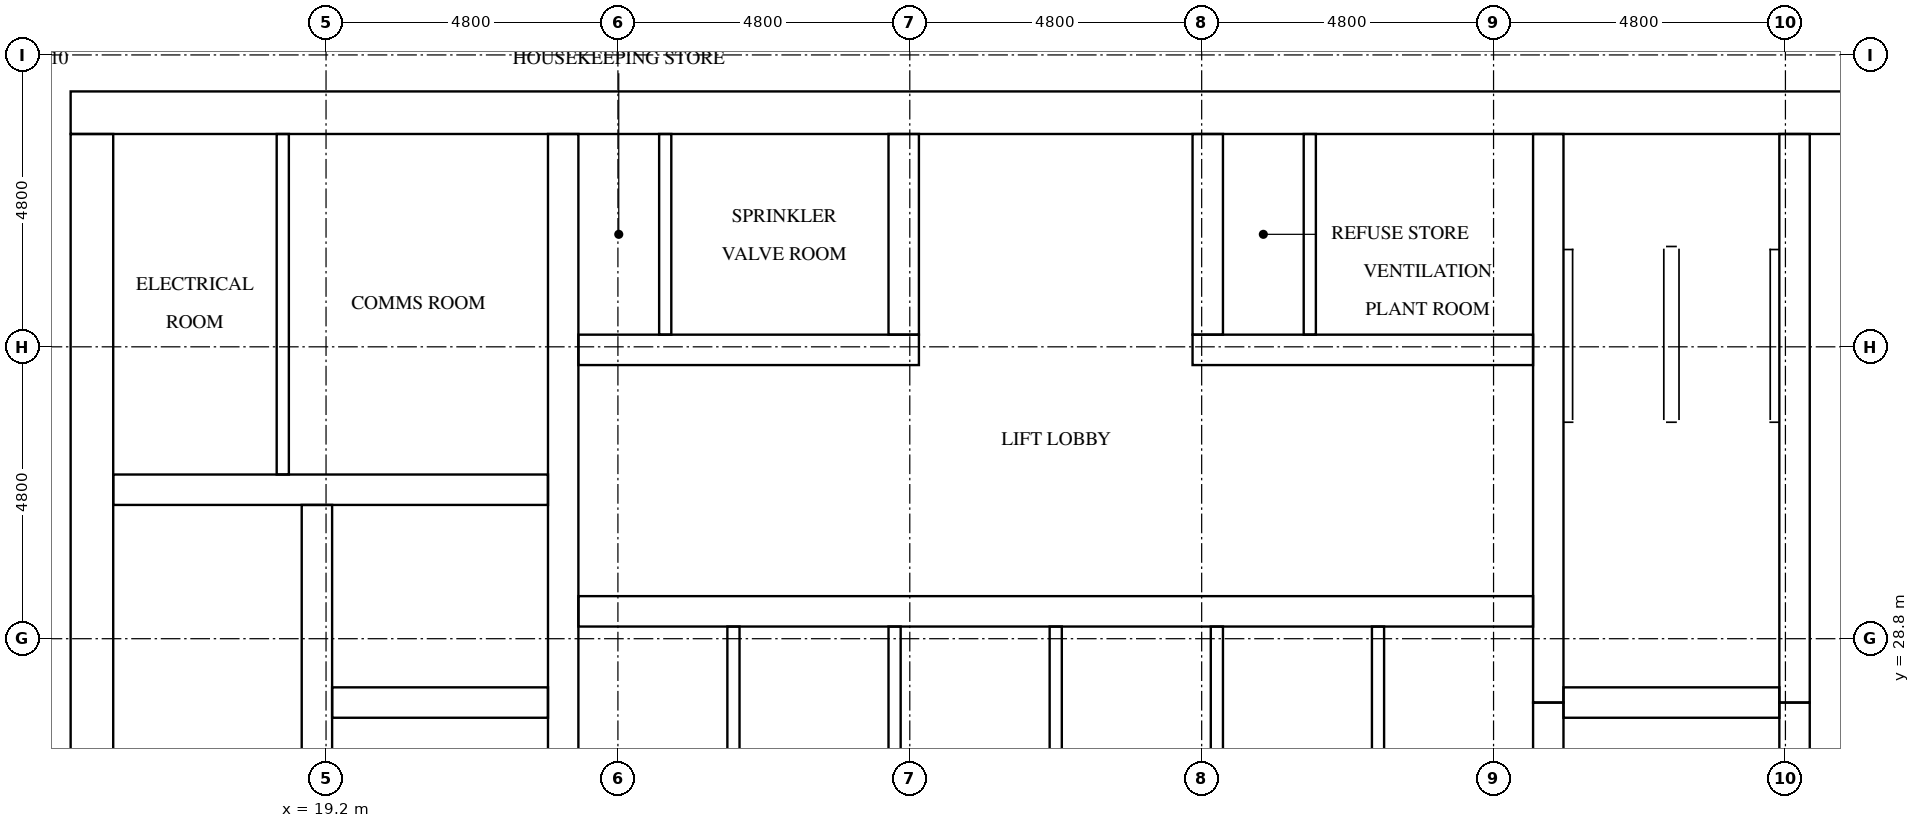
"""IFC4 building model, lengths in metres.
Left out: names, types, materials, properties, quantities, classifications, styles, units other than length and angle.
Written with IfcOpenShell. Run it as: python <this file> out.ifc"""

import sys

from ifc_helpers import new_model, si_unit, direction, frame, frame_2d, origin, place, context, subcontext, project, spatial, rectangle, extrude, element, fill, save


model = new_model("IFC4")
c1 = context("Model", 3, precision=1e-05, world=origin(), true_north=direction((0.0, 1.0)))
c2 = subcontext(c1, "Body", "Model", "MODEL_VIEW")
j1 = project(units=[si_unit("LENGTHUNIT", "METRE"), si_unit("PLANEANGLEUNIT", "RADIAN")], contexts=[c1])
p1 = place(None, origin())
s1 = spatial("IfcSite", under=j1, at=p1, CompositionType="ELEMENT")
p2 = place(p1, origin())
s2 = spatial("IfcBuilding", under=s1, at=p2, CompositionType="ELEMENT")
p3 = place(p2, frame((0.0, 0.0, 199.9)))
s3 = spatial("IfcBuildingStorey", under=s2, at=p3, CompositionType="ELEMENT", Elevation=199.9)
p4 = place(p3, frame((15.0, 37.45, 0.0), z_axis=(0.0, 0.0, 1.0), x_axis=(1.0, 0.0, 0.0)))
e1 = element("IfcWall", 1, at=p4, inside=s3, PredefinedType="SHEAR", context=c2, shape_type="SweptSolid", body=[
    extrude(rectangle(XDim=32.4, YDim=0.7, at=frame_2d((16.2, 0.0))), origin(), (0.0, 0.0, 1.0), 3.1),
])
p5 = place(p4, frame((15.3, 0.0, 0.0)))
e2 = element("IfcOpeningElement", 2, at=p5, cuts=e1, PredefinedType="OPENING", context=c2, shape_type="SweptSolid", body=[
    extrude(rectangle(XDim=1.8, YDim=2.1, at=frame_2d((0.9, 1.05))), frame((0.0, 0.36, 0.0), z_axis=(0.0, -1.0, 0.0), x_axis=(1.0, 0.0, 0.0)), (0.0, 0.0, 1.0), 0.72),
])
p6 = place(p4, frame((1.544, 0.0, 0.0)))
e3 = element("IfcOpeningElement", 3, at=p6, cuts=e1, PredefinedType="OPENING", context=c2, shape_type="SweptSolid", body=[
    extrude(rectangle(XDim=1.0, YDim=2.1, at=frame_2d((0.5, 1.05))), frame((0.0, 0.36, 0.0), z_axis=(0.0, -1.0, 0.0), x_axis=(1.0, 0.0, 0.0)), (0.0, 0.0, 1.0), 0.72),
])
p7 = place(p4, frame((5.219, 0.0, 0.0)))
e4 = element("IfcOpeningElement", 4, at=p7, cuts=e1, PredefinedType="OPENING", context=c2, shape_type="SweptSolid", body=[
    extrude(rectangle(XDim=1.0, YDim=2.1, at=frame_2d((0.5, 1.05))), frame((0.0, 0.36, 0.0), z_axis=(0.0, -1.0, 0.0), x_axis=(1.0, 0.0, 0.0)), (0.0, 0.0, 1.0), 0.72),
])
p8 = place(p3, frame((15.35, 15.7, 0.0), z_axis=(0.0, 0.0, 1.0), x_axis=(0.0, 1.0, 0.0)))
e5 = element("IfcWall", 5, at=p8, inside=s3, PredefinedType="SHEAR", context=c2, shape_type="SweptSolid", body=[
    extrude(rectangle(XDim=21.4, YDim=0.7, at=frame_2d((10.7, 0.0))), origin(), (0.0, 0.0, 1.0), 3.1),
])
p9 = place(p8, frame((5.06, 0.0, 0.0)))
e6 = element("IfcOpeningElement", 6, at=p9, cuts=e5, PredefinedType="OPENING", context=c2, shape_type="SweptSolid", body=[
    extrude(rectangle(XDim=1.2, YDim=2.1, at=frame_2d((0.6, 1.05))), frame((0.0, 0.36, 0.0), z_axis=(0.0, -1.0, 0.0), x_axis=(1.0, 0.0, 0.0)), (0.0, 0.0, 1.0), 0.72),
])
p10 = place(p3, frame((19.05, 15.7, 0.0), z_axis=(0.0, 0.0, 1.0), x_axis=(0.0, 1.0, 0.0)))
e7 = element("IfcWall", 7, at=p10, inside=s3, PredefinedType="SHEAR", context=c2, shape_type="SweptSolid", body=[
    extrude(rectangle(XDim=15.3, YDim=0.5, at=frame_2d((7.65, 0.0))), origin(), (0.0, 0.0, 1.0), 3.1),
])
p11 = place(p10, frame((9.75, 0.0, 0.0)))
e8 = element("IfcOpeningElement", 8, at=p11, cuts=e7, PredefinedType="OPENING", context=c2, shape_type="SweptSolid", body=[
    extrude(rectangle(XDim=1.1, YDim=2.1, at=frame_2d((0.55, 1.05))), frame((0.0, 0.26, 0.0), z_axis=(0.0, -1.0, 0.0), x_axis=(1.0, 0.0, 0.0)), (0.0, 0.0, 1.0), 0.52),
])
p12 = place(p10, frame((13.25, 0.0, 0.0)))
e9 = element("IfcOpeningElement", 9, at=p12, cuts=e7, PredefinedType="OPENING", context=c2, shape_type="SweptSolid", body=[
    extrude(rectangle(XDim=1.1, YDim=2.1, at=frame_2d((0.55, 1.05))), frame((0.0, 0.26, 0.0), z_axis=(0.0, -1.0, 0.0), x_axis=(1.0, 0.0, 0.0)), (0.0, 0.0, 1.0), 0.52),
])
p13 = place(p10, frame((0.5, 0.0, 0.0)))
e10 = element("IfcOpeningElement", 10, at=p13, cuts=e7, PredefinedType="OPENING", context=c2, shape_type="SweptSolid", body=[
    extrude(rectangle(XDim=1.2, YDim=2.1, at=frame_2d((0.6, 1.05))), frame((0.0, 0.26, 0.0), z_axis=(0.0, -1.0, 0.0), x_axis=(1.0, 0.0, 0.0)), (0.0, 0.0, 1.0), 0.52),
])
p14 = place(p3, frame((23.1, 15.7, 0.0), z_axis=(0.0, 0.0, 1.0), x_axis=(0.0, 1.0, 0.0)))
e11 = element("IfcWall", 11, at=p14, inside=s3, PredefinedType="SHEAR", context=c2, shape_type="SweptSolid", body=[
    extrude(rectangle(XDim=21.4, YDim=0.5, at=frame_2d((10.7, 0.0))), origin(), (0.0, 0.0, 1.0), 3.1),
])
p15 = place(p3, frame((39.3, 24.25, 0.0), z_axis=(0.0, 0.0, 1.0), x_axis=(0.0, 1.0, 0.0)))
e12 = element("IfcWall", 12, at=p15, inside=s3, PredefinedType="SHEAR", context=c2, shape_type="SweptSolid", body=[
    extrude(rectangle(XDim=3.5, YDim=0.5, at=frame_2d((1.75, 0.0))), origin(), (0.0, 0.0, 1.0), 3.1),
])
p16 = place(p3, frame((39.3, 27.75, 0.0), z_axis=(0.0, 0.0, 1.0), x_axis=(0.0, 1.0, 0.0)))
e13 = element("IfcWall", 13, at=p16, inside=s3, PredefinedType="SHEAR", context=c2, shape_type="SweptSolid", body=[
    extrude(rectangle(XDim=9.35, YDim=0.5, at=frame_2d((4.675, 0.0))), origin(), (0.0, 0.0, 1.0), 3.1),
])
p17 = place(p3, frame((43.35, 24.25, 0.0), z_axis=(0.0, 0.0, 1.0), x_axis=(0.0, 1.0, 0.0)))
e14 = element("IfcWall", 14, at=p17, inside=s3, PredefinedType="SHEAR", context=c2, shape_type="SweptSolid", body=[
    extrude(rectangle(XDim=3.5, YDim=0.5, at=frame_2d((1.75, 0.0))), origin(), (0.0, 0.0, 1.0), 3.1),
])
p18 = place(p17, frame((1.2, 0.0, 0.0)))
e15 = element("IfcOpeningElement", 15, at=p18, cuts=e14, PredefinedType="OPENING", context=c2, shape_type="SweptSolid", body=[
    extrude(rectangle(XDim=1.1, YDim=2.1, at=frame_2d((0.55, 1.05))), frame((0.0, 0.26, 0.0), z_axis=(0.0, -1.0, 0.0), x_axis=(1.0, 0.0, 0.0)), (0.0, 0.0, 1.0), 0.52),
])
p19 = place(p3, frame((43.35, 27.75, 0.0), z_axis=(0.0, 0.0, 1.0), x_axis=(0.0, 1.0, 0.0)))
e16 = element("IfcWall", 16, at=p19, inside=s3, PredefinedType="SHEAR", context=c2, shape_type="SweptSolid", body=[
    extrude(rectangle(XDim=9.35, YDim=0.5, at=frame_2d((4.675, 0.0))), origin(), (0.0, 0.0, 1.0), 3.1),
])
p20 = place(p19, frame((7.65, 0.0, 0.0)))
e17 = element("IfcOpeningElement", 17, at=p20, cuts=e16, PredefinedType="OPENING", context=c2, shape_type="SweptSolid", body=[
    extrude(rectangle(XDim=1.2, YDim=2.1, at=frame_2d((0.6, 1.05))), frame((0.0, 0.26, 0.0), z_axis=(0.0, -1.0, 0.0), x_axis=(1.0, 0.0, 0.0)), (0.0, 0.0, 1.0), 0.52),
])
p21 = place(p3, frame((19.3, 27.75, 0.0), z_axis=(0.0, 0.0, 1.0), x_axis=(1.0, 0.0, 0.0)))
e18 = element("IfcWall", 18, at=p21, inside=s3, PredefinedType="SHEAR", context=c2, shape_type="SweptSolid", body=[
    extrude(rectangle(XDim=3.55, YDim=0.5, at=frame_2d((1.775, 0.0))), origin(), (0.0, 0.0, 1.0), 3.1),
])
p22 = place(p3, frame((15.7, 31.25, 0.0), z_axis=(0.0, 0.0, 1.0), x_axis=(1.0, 0.0, 0.0)))
e19 = element("IfcWall", 19, at=p22, inside=s3, PredefinedType="SHEAR", context=c2, shape_type="SweptSolid", body=[
    extrude(rectangle(XDim=7.15, YDim=0.5, at=frame_2d((3.575, 0.0))), origin(), (0.0, 0.0, 1.0), 3.1),
])
p23 = place(p3, frame((39.55, 27.75, 0.0), z_axis=(0.0, 0.0, 1.0), x_axis=(1.0, 0.0, 0.0)))
e20 = element("IfcWall", 20, at=p23, inside=s3, PredefinedType="SHEAR", context=c2, shape_type="SweptSolid", body=[
    extrude(rectangle(XDim=3.55, YDim=0.5, at=frame_2d((1.775, 0.0))), origin(), (0.0, 0.0, 1.0), 3.1),
])
p24 = place(p3, frame((23.35, 29.25, 0.0), z_axis=(0.0, 0.0, 1.0), x_axis=(1.0, 0.0, 0.0)))
e21 = element("IfcWall", 21, at=p24, inside=s3, PredefinedType="SHEAR", context=c2, shape_type="SweptSolid", body=[
    extrude(rectangle(XDim=15.7, YDim=0.5, at=frame_2d((7.85, 0.0))), origin(), (0.0, 0.0, 1.0), 3.1),
])
p25 = place(p24, frame((0.675, 0.0, 0.0)))
e22 = element("IfcOpeningElement", 22, at=p25, cuts=e21, PredefinedType="OPENING", context=c2, shape_type="SweptSolid", body=[
    extrude(rectangle(XDim=1.1, YDim=2.1, at=frame_2d((0.55, 1.05))), frame((0.0, 0.26, 0.0), z_axis=(0.0, -1.0, 0.0), x_axis=(1.0, 0.0, 0.0)), (0.0, 0.0, 1.0), 0.52),
])
p26 = place(p24, frame((3.325, 0.0, 0.0)))
e23 = element("IfcOpeningElement", 23, at=p26, cuts=e21, PredefinedType="OPENING", context=c2, shape_type="SweptSolid", body=[
    extrude(rectangle(XDim=1.1, YDim=2.1, at=frame_2d((0.55, 1.05))), frame((0.0, 0.26, 0.0), z_axis=(0.0, -1.0, 0.0), x_axis=(1.0, 0.0, 0.0)), (0.0, 0.0, 1.0), 0.52),
])
p27 = place(p24, frame((5.975, 0.0, 0.0)))
e24 = element("IfcOpeningElement", 24, at=p27, cuts=e21, PredefinedType="OPENING", context=c2, shape_type="SweptSolid", body=[
    extrude(rectangle(XDim=1.1, YDim=2.1, at=frame_2d((0.55, 1.05))), frame((0.0, 0.26, 0.0), z_axis=(0.0, -1.0, 0.0), x_axis=(1.0, 0.0, 0.0)), (0.0, 0.0, 1.0), 0.52),
])
p28 = place(p24, frame((8.625, 0.0, 0.0)))
e25 = element("IfcOpeningElement", 25, at=p28, cuts=e21, PredefinedType="OPENING", context=c2, shape_type="SweptSolid", body=[
    extrude(rectangle(XDim=1.1, YDim=2.1, at=frame_2d((0.55, 1.05))), frame((0.0, 0.26, 0.0), z_axis=(0.0, -1.0, 0.0), x_axis=(1.0, 0.0, 0.0)), (0.0, 0.0, 1.0), 0.52),
])
p29 = place(p24, frame((11.275, 0.0, 0.0)))
e26 = element("IfcOpeningElement", 26, at=p29, cuts=e21, PredefinedType="OPENING", context=c2, shape_type="SweptSolid", body=[
    extrude(rectangle(XDim=1.1, YDim=2.1, at=frame_2d((0.55, 1.05))), frame((0.0, 0.26, 0.0), z_axis=(0.0, -1.0, 0.0), x_axis=(1.0, 0.0, 0.0)), (0.0, 0.0, 1.0), 0.52),
])
p30 = place(p24, frame((13.925, 0.0, 0.0)))
e27 = element("IfcOpeningElement", 27, at=p30, cuts=e21, PredefinedType="OPENING", context=c2, shape_type="SweptSolid", body=[
    extrude(rectangle(XDim=1.1, YDim=2.1, at=frame_2d((0.55, 1.05))), frame((0.0, 0.26, 0.0), z_axis=(0.0, -1.0, 0.0), x_axis=(1.0, 0.0, 0.0)), (0.0, 0.0, 1.0), 0.52),
])
p31 = place(p3, frame((23.35, 33.55, 0.0), z_axis=(0.0, 0.0, 1.0), x_axis=(1.0, 0.0, 0.0)))
e28 = element("IfcWall", 28, at=p31, inside=s3, PredefinedType="SHEAR", context=c2, shape_type="SweptSolid", body=[
    extrude(rectangle(XDim=5.6, YDim=0.5, at=frame_2d((2.8, 0.0))), origin(), (0.0, 0.0, 1.0), 3.1),
])
p32 = place(p31, frame((0.164, 0.0, 0.0)))
e29 = element("IfcOpeningElement", 29, at=p32, cuts=e28, PredefinedType="OPENING", context=c2, shape_type="SweptSolid", body=[
    extrude(rectangle(XDim=1.0, YDim=2.1, at=frame_2d((0.5, 1.05))), frame((0.0, 0.26, 0.0), z_axis=(0.0, -1.0, 0.0), x_axis=(1.0, 0.0, 0.0)), (0.0, 0.0, 1.0), 0.52),
])
p33 = place(p31, frame((2.814, 0.0, 0.0)))
e30 = element("IfcOpeningElement", 30, at=p33, cuts=e28, PredefinedType="OPENING", context=c2, shape_type="SweptSolid", body=[
    extrude(rectangle(XDim=1.0, YDim=2.1, at=frame_2d((0.5, 1.05))), frame((0.0, 0.26, 0.0), z_axis=(0.0, -1.0, 0.0), x_axis=(1.0, 0.0, 0.0)), (0.0, 0.0, 1.0), 0.52),
])
p34 = place(p3, frame((33.45, 33.55, 0.0), z_axis=(0.0, 0.0, 1.0), x_axis=(1.0, 0.0, 0.0)))
e31 = element("IfcWall", 31, at=p34, inside=s3, PredefinedType="SHEAR", context=c2, shape_type="SweptSolid", body=[
    extrude(rectangle(XDim=5.6, YDim=0.5, at=frame_2d((2.8, 0.0))), origin(), (0.0, 0.0, 1.0), 3.1),
])
p35 = place(p34, frame((0.664, 0.0, 0.0)))
e32 = element("IfcOpeningElement", 32, at=p35, cuts=e31, PredefinedType="OPENING", context=c2, shape_type="SweptSolid", body=[
    extrude(rectangle(XDim=1.0, YDim=2.1, at=frame_2d((0.5, 1.05))), frame((0.0, 0.26, 0.0), z_axis=(0.0, -1.0, 0.0), x_axis=(1.0, 0.0, 0.0)), (0.0, 0.0, 1.0), 0.52),
])
p36 = place(p34, frame((3.314, 0.0, 0.0)))
e33 = element("IfcOpeningElement", 33, at=p36, cuts=e31, PredefinedType="OPENING", context=c2, shape_type="SweptSolid", body=[
    extrude(rectangle(XDim=1.0, YDim=2.1, at=frame_2d((0.5, 1.05))), frame((0.0, 0.26, 0.0), z_axis=(0.0, -1.0, 0.0), x_axis=(1.0, 0.0, 0.0)), (0.0, 0.0, 1.0), 0.52),
])
for number, where, z_axis, x_axis in (
    (34, (28.7, 33.8, 0.0), (0.0, 0.0, 1.0), (0.0, 1.0, 0.0)),
    (35, (33.7, 33.8, 0.0), (0.0, 0.0, 1.0), (0.0, 1.0, 0.0)),
):
    element("IfcWall", number, at=place(p3, frame(where, z_axis=z_axis, x_axis=x_axis)), inside=s3, PredefinedType="SHEAR", context=c2, shape_type="SweptSolid", body=[
        extrude(rectangle(XDim=3.3, YDim=0.5, at=frame_2d((1.65, 0.0))), origin(), (0.0, 0.0, 1.0), 3.1),
    ])
for number, where, z_axis, x_axis in (
    (36, (25.9, 26.4, 0.0), (0.0, 0.0, 1.0), (0.0, 1.0, 0.0)),
    (37, (28.55, 26.4, 0.0), (0.0, 0.0, 1.0), (0.0, 1.0, 0.0)),
    (38, (31.2, 26.4, 0.0), (0.0, 0.0, 1.0), (0.0, 1.0, 0.0)),
    (39, (33.85, 26.4, 0.0), (0.0, 0.0, 1.0), (0.0, 1.0, 0.0)),
    (40, (36.5, 26.4, 0.0), (0.0, 0.0, 1.0), (0.0, 1.0, 0.0)),
):
    element("IfcWall", number, at=place(p3, frame(where, z_axis=z_axis, x_axis=x_axis)), inside=s3, PredefinedType="SOLIDWALL", context=c2, shape_type="SweptSolid", body=[
        extrude(rectangle(XDim=2.6, YDim=0.2, at=frame_2d((1.3, 0.0))), origin(), (0.0, 0.0, 1.0), 3.1),
    ])
p37 = place(p3, frame((18.489, 31.5, 0.0), z_axis=(0.0, 0.0, 1.0), x_axis=(0.0, 1.0, 0.0)))
e41 = element("IfcWall", 41, at=p37, inside=s3, PredefinedType="PARTITIONING", context=c2, shape_type="SweptSolid", body=[
    extrude(rectangle(XDim=5.6, YDim=0.2, at=frame_2d((2.8, 0.0))), origin(), (0.0, 0.0, 1.0), 3.1),
])
for number, where, z_axis, x_axis in (
    (42, (24.778, 33.8, 0.0), (0.0, 0.0, 1.0), (0.0, 1.0, 0.0)),
    (43, (35.378, 33.8, 0.0), (0.0, 0.0, 1.0), (0.0, 1.0, 0.0)),
):
    element("IfcWall", number, at=place(p3, frame(where, z_axis=z_axis, x_axis=x_axis)), inside=s3, PredefinedType="PARTITIONING", context=c2, shape_type="SweptSolid", body=[
        extrude(rectangle(XDim=3.3, YDim=0.2, at=frame_2d((1.65, 0.0))), origin(), (0.0, 0.0, 1.0), 3.1),
    ])
p38 = place(p25, origin())
e44 = element("IfcDoor", 44, at=p38, inside=s3, OperationType="DOUBLE_DOOR_SLIDING", PredefinedType="DOOR", context=c2, shape_type="SweptSolid", body=[
    extrude(rectangle(XDim=1.1, YDim=2.1, at=frame_2d((0.55, 1.05))), frame((0.0, 0.025, 0.0), z_axis=(0.0, -1.0, 0.0), x_axis=(1.0, 0.0, 0.0)), (0.0, 0.0, 1.0), 0.05),
])
fill(e22, e44)
p39 = place(p26, origin())
e45 = element("IfcDoor", 45, at=p39, inside=s3, OperationType="DOUBLE_DOOR_SLIDING", PredefinedType="DOOR", context=c2, shape_type="SweptSolid", body=[
    extrude(rectangle(XDim=1.1, YDim=2.1, at=frame_2d((0.55, 1.05))), frame((0.0, 0.025, 0.0), z_axis=(0.0, -1.0, 0.0), x_axis=(1.0, 0.0, 0.0)), (0.0, 0.0, 1.0), 0.05),
])
fill(e23, e45)
p40 = place(p27, origin())
e46 = element("IfcDoor", 46, at=p40, inside=s3, OperationType="DOUBLE_DOOR_SLIDING", PredefinedType="DOOR", context=c2, shape_type="SweptSolid", body=[
    extrude(rectangle(XDim=1.1, YDim=2.1, at=frame_2d((0.55, 1.05))), frame((0.0, 0.025, 0.0), z_axis=(0.0, -1.0, 0.0), x_axis=(1.0, 0.0, 0.0)), (0.0, 0.0, 1.0), 0.05),
])
fill(e24, e46)
p41 = place(p28, origin())
e47 = element("IfcDoor", 47, at=p41, inside=s3, OperationType="DOUBLE_DOOR_SLIDING", PredefinedType="DOOR", context=c2, shape_type="SweptSolid", body=[
    extrude(rectangle(XDim=1.1, YDim=2.1, at=frame_2d((0.55, 1.05))), frame((0.0, 0.025, 0.0), z_axis=(0.0, -1.0, 0.0), x_axis=(1.0, 0.0, 0.0)), (0.0, 0.0, 1.0), 0.05),
])
fill(e25, e47)
p42 = place(p29, origin())
e48 = element("IfcDoor", 48, at=p42, inside=s3, OperationType="DOUBLE_DOOR_SLIDING", PredefinedType="DOOR", context=c2, shape_type="SweptSolid", body=[
    extrude(rectangle(XDim=1.1, YDim=2.1, at=frame_2d((0.55, 1.05))), frame((0.0, 0.025, 0.0), z_axis=(0.0, -1.0, 0.0), x_axis=(1.0, 0.0, 0.0)), (0.0, 0.0, 1.0), 0.05),
])
fill(e26, e48)
p43 = place(p30, origin())
e49 = element("IfcDoor", 49, at=p43, inside=s3, OperationType="DOUBLE_DOOR_SLIDING", PredefinedType="DOOR", context=c2, shape_type="SweptSolid", body=[
    extrude(rectangle(XDim=1.1, YDim=2.1, at=frame_2d((0.55, 1.05))), frame((0.0, 0.025, 0.0), z_axis=(0.0, -1.0, 0.0), x_axis=(1.0, 0.0, 0.0)), (0.0, 0.0, 1.0), 0.05),
])
fill(e27, e49)
p44 = place(p12, origin())
e50 = element("IfcDoor", 50, at=p44, inside=s3, OperationType="DOUBLE_DOOR_SLIDING", PredefinedType="DOOR", context=c2, shape_type="SweptSolid", body=[
    extrude(rectangle(XDim=1.1, YDim=2.1, at=frame_2d((0.55, 1.05))), frame((0.0, 0.025, 0.0), z_axis=(0.0, -1.0, 0.0), x_axis=(1.0, 0.0, 0.0)), (0.0, 0.0, 1.0), 0.05),
])
fill(e9, e50)
p45 = place(p20, origin())
e51 = element("IfcDoor", 51, at=p45, inside=s3, OperationType="SINGLE_SWING_RIGHT", PredefinedType="DOOR", context=c2, shape_type="SweptSolid", body=[
    extrude(rectangle(XDim=1.2, YDim=2.1, at=frame_2d((0.6, 1.05))), frame((0.0, 0.025, 0.0), z_axis=(0.0, -1.0, 0.0), x_axis=(1.0, 0.0, 0.0)), (0.0, 0.0, 1.0), 0.05),
])
fill(e17, e51)
p46 = place(p5, origin())
e52 = element("IfcDoor", 52, at=p46, inside=s3, OperationType="DOUBLE_DOOR_SINGLE_SWING", PredefinedType="DOOR", context=c2, shape_type="SweptSolid", body=[
    extrude(rectangle(XDim=1.8, YDim=2.1, at=frame_2d((0.9, 1.05))), frame((0.0, 0.025, 0.0), z_axis=(0.0, -1.0, 0.0), x_axis=(1.0, 0.0, 0.0)), (0.0, 0.0, 1.0), 0.05),
])
fill(e2, e52)
p47 = place(p6, origin())
e53 = element("IfcDoor", 53, at=p47, inside=s3, OperationType="SINGLE_SWING_LEFT", PredefinedType="DOOR", context=c2, shape_type="SweptSolid", body=[
    extrude(rectangle(XDim=1.0, YDim=2.1, at=frame_2d((0.5, 1.05))), frame((0.0, 0.025, 0.0), z_axis=(0.0, -1.0, 0.0), x_axis=(1.0, 0.0, 0.0)), (0.0, 0.0, 1.0), 0.05),
])
fill(e3, e53)
p48 = place(p7, origin())
e54 = element("IfcDoor", 54, at=p48, inside=s3, OperationType="SINGLE_SWING_RIGHT", PredefinedType="DOOR", context=c2, shape_type="SweptSolid", body=[
    extrude(rectangle(XDim=1.0, YDim=2.1, at=frame_2d((0.5, 1.05))), frame((0.0, 0.025, 0.0), z_axis=(0.0, -1.0, 0.0), x_axis=(1.0, 0.0, 0.0)), (0.0, 0.0, 1.0), 0.05),
])
fill(e4, e54)
p49 = place(p32, frame((1.0, 0.0, 0.0), z_axis=(0.0, 0.0, 1.0), x_axis=(-1.0, 0.0, 0.0)))
e55 = element("IfcDoor", 55, at=p49, inside=s3, OperationType="SINGLE_SWING_LEFT", PredefinedType="DOOR", context=c2, shape_type="SweptSolid", body=[
    extrude(rectangle(XDim=1.0, YDim=2.1, at=frame_2d((0.5, 1.05))), frame((0.0, 0.025, 0.0), z_axis=(0.0, -1.0, 0.0), x_axis=(1.0, 0.0, 0.0)), (0.0, 0.0, 1.0), 0.05),
])
fill(e29, e55)
p50 = place(p33, frame((1.0, 0.0, 0.0), z_axis=(0.0, 0.0, 1.0), x_axis=(-1.0, 0.0, 0.0)))
e56 = element("IfcDoor", 56, at=p50, inside=s3, OperationType="SINGLE_SWING_RIGHT", PredefinedType="DOOR", context=c2, shape_type="SweptSolid", body=[
    extrude(rectangle(XDim=1.0, YDim=2.1, at=frame_2d((0.5, 1.05))), frame((0.0, 0.025, 0.0), z_axis=(0.0, -1.0, 0.0), x_axis=(1.0, 0.0, 0.0)), (0.0, 0.0, 1.0), 0.05),
])
fill(e30, e56)
p51 = place(p35, frame((1.0, 0.0, 0.0), z_axis=(0.0, 0.0, 1.0), x_axis=(-1.0, 0.0, 0.0)))
e57 = element("IfcDoor", 57, at=p51, inside=s3, OperationType="SINGLE_SWING_LEFT", PredefinedType="DOOR", context=c2, shape_type="SweptSolid", body=[
    extrude(rectangle(XDim=1.0, YDim=2.1, at=frame_2d((0.5, 1.05))), frame((0.0, 0.025, 0.0), z_axis=(0.0, -1.0, 0.0), x_axis=(1.0, 0.0, 0.0)), (0.0, 0.0, 1.0), 0.05),
])
fill(e32, e57)
p52 = place(p36, frame((1.0, 0.0, 0.0), z_axis=(0.0, 0.0, 1.0), x_axis=(-1.0, 0.0, 0.0)))
e58 = element("IfcDoor", 58, at=p52, inside=s3, OperationType="SINGLE_SWING_RIGHT", PredefinedType="DOOR", context=c2, shape_type="SweptSolid", body=[
    extrude(rectangle(XDim=1.0, YDim=2.1, at=frame_2d((0.5, 1.05))), frame((0.0, 0.025, 0.0), z_axis=(0.0, -1.0, 0.0), x_axis=(1.0, 0.0, 0.0)), (0.0, 0.0, 1.0), 0.05),
])
fill(e33, e58)
save(model, sys.argv[1])
